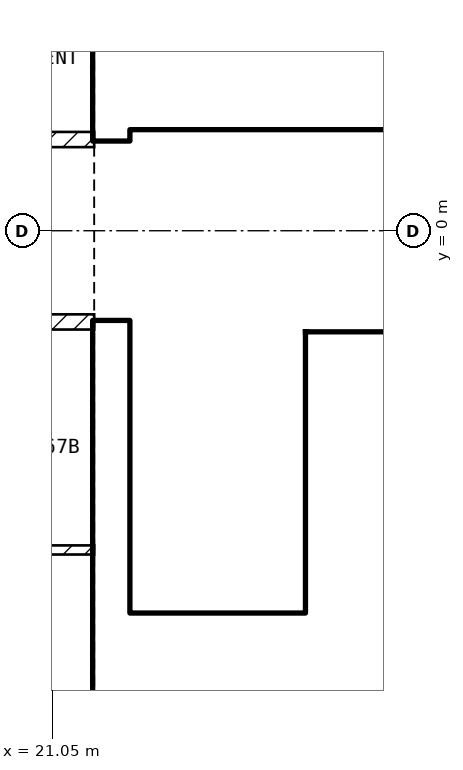
"""IFC4 building model, lengths in metres.
Left out: names, types, materials, properties, quantities, classifications, styles, units other than length and angle.
Written with IfcOpenShell. Run it as: python <this file> out.ifc"""

import sys

from ifc_helpers import new_model, si_unit, direction, frame, frame_2d, origin, place, context, subcontext, project, spatial, rectangle, extrude, element, fill, save


model = new_model("IFC4")
c1 = context("Model", 3, precision=1e-05, world=origin(), true_north=direction((0.0, 1.0)))
c2 = subcontext(c1, "Body", "Model", "MODEL_VIEW")
j1 = project(units=[si_unit("LENGTHUNIT", "METRE"), si_unit("PLANEANGLEUNIT", "RADIAN")], contexts=[c1])
p1 = place(None, origin())
s1 = spatial("IfcSite", under=j1, at=p1, CompositionType="ELEMENT")
p2 = place(p1, origin())
s2 = spatial("IfcBuilding", under=s1, at=p2, CompositionType="ELEMENT")
p3 = place(p2, frame((0.0, 0.0, 264.0)))
s3 = spatial("IfcBuildingStorey", under=s2, at=p3, CompositionType="ELEMENT", Elevation=264.0)
for number, where, z_axis, x_axis in (
    (1, (21.825, -8.1, 0.0), (0.0, 0.0, 1.0), (0.0, 1.0, 0.0)),
    (2, (21.825, 1.2, 0.0), (0.0, 0.0, 1.0), (0.0, 1.0, 0.0)),
):
    element("IfcWall", number, at=place(p3, frame(where, z_axis=z_axis, x_axis=x_axis)), inside=s3, PredefinedType="SHEAR", context=c2, shape_type="SweptSolid", body=[
        extrude(rectangle(XDim=6.9, YDim=0.45, at=frame_2d((3.45, 0.0))), origin(), (0.0, 0.0, 1.0), 3.25),
    ])
p4 = place(p3, frame((22.05, 1.45, 0.0), z_axis=(0.0, 0.0, 1.0), x_axis=(1.0, 0.0, 0.0)))
e3 = element("IfcWall", 3, at=p4, inside=s3, PredefinedType="SOLIDWALL", context=c2, shape_type="SweptSolid", body=[
    extrude(rectangle(XDim=11.3, YDim=0.2, at=frame_2d((5.65, 0.0))), origin(), (0.0, 0.0, 1.0), 3.25),
])
p5 = place(p4, frame((0.75, 0.0, 0.0)))
e4 = element("IfcOpeningElement", 4, at=p5, cuts=e3, PredefinedType="OPENING", context=c2, shape_type="SweptSolid", body=[
    extrude(rectangle(XDim=1.0, YDim=2.1, at=frame_2d((0.5, 1.05))), frame((0.0, 0.11, 0.0), z_axis=(0.0, -1.0, 0.0), x_axis=(1.0, 0.0, 0.0)), (0.0, 0.0, 1.0), 0.22),
])
p6 = place(p4, frame((3.25, 0.0, 0.0)))
e5 = element("IfcOpeningElement", 5, at=p6, cuts=e3, PredefinedType="OPENING", context=c2, shape_type="SweptSolid", body=[
    extrude(rectangle(XDim=1.0, YDim=2.1, at=frame_2d((0.5, 1.05))), frame((0.0, 0.11, 0.0), z_axis=(0.0, -1.0, 0.0), x_axis=(1.0, 0.0, 0.0)), (0.0, 0.0, 1.0), 0.22),
])
p7 = place(p4, frame((9.225, 0.0, 0.0)))
e6 = element("IfcOpeningElement", 6, at=p7, cuts=e3, PredefinedType="OPENING", context=c2, shape_type="SweptSolid", body=[
    extrude(rectangle(XDim=0.9, YDim=2.1, at=frame_2d((0.45, 1.05))), frame((0.0, 0.11, 0.0), z_axis=(0.0, -1.0, 0.0), x_axis=(1.0, 0.0, 0.0)), (0.0, 0.0, 1.0), 0.22),
])
p8 = place(p3, frame((24.5, -5.05, 0.0), z_axis=(0.0, 0.0, 1.0), x_axis=(0.0, 1.0, 0.0)))
e7 = element("IfcWall", 7, at=p8, inside=s3, PredefinedType="SOLIDWALL", context=c2, shape_type="SweptSolid", body=[
    extrude(rectangle(XDim=3.7, YDim=0.2, at=frame_2d((1.85, 0.0))), origin(), (0.0, 0.0, 1.0), 3.25),
])
p9 = place(p8, frame((0.1, 0.0, 0.0)))
e8 = element("IfcOpeningElement", 8, at=p9, cuts=e7, PredefinedType="OPENING", context=c2, shape_type="SweptSolid", body=[
    extrude(rectangle(XDim=0.8, YDim=2.1, at=frame_2d((0.4, 1.05))), frame((0.0, 0.11, 0.0), z_axis=(0.0, -1.0, 0.0), x_axis=(1.0, 0.0, 0.0)), (0.0, 0.0, 1.0), 0.22),
])
p10 = place(p3, frame((22.05, -5.15, 0.0), z_axis=(0.0, 0.0, 1.0), x_axis=(1.0, 0.0, 0.0)))
e9 = element("IfcWall", 9, at=p10, inside=s3, PredefinedType="SOLIDWALL", context=c2, shape_type="SweptSolid", body=[
    extrude(rectangle(XDim=6.3, YDim=0.2, at=frame_2d((3.15, 0.0))), origin(), (0.0, 0.0, 1.0), 3.25),
])
p11 = place(p10, frame((0.2, 0.0, 0.0)))
e10 = element("IfcOpeningElement", 10, at=p11, cuts=e9, PredefinedType="OPENING", context=c2, shape_type="SweptSolid", body=[
    extrude(rectangle(XDim=1.0, YDim=2.1, at=frame_2d((0.5, 1.05))), frame((0.0, 0.11, 0.0), z_axis=(0.0, -1.0, 0.0), x_axis=(1.0, 0.0, 0.0)), (0.0, 0.0, 1.0), 0.22),
])
p12 = place(p3, frame((24.6, -1.45, 0.0), z_axis=(0.0, 0.0, 1.0), x_axis=(1.0, 0.0, 0.0)))
e11 = element("IfcWall", 11, at=p12, inside=s3, PredefinedType="SOLIDWALL", context=c2, shape_type="SweptSolid", body=[
    extrude(rectangle(XDim=8.75, YDim=0.2, at=frame_2d((4.375, 0.0))), origin(), (0.0, 0.0, 1.0), 3.25),
])
p13 = place(p12, frame((0.4, 0.0, 0.0)))
e12 = element("IfcOpeningElement", 12, at=p13, cuts=e11, PredefinedType="OPENING", context=c2, shape_type="SweptSolid", body=[
    extrude(rectangle(XDim=1.0, YDim=2.1, at=frame_2d((0.5, 1.05))), frame((0.0, 0.11, 0.0), z_axis=(0.0, -1.0, 0.0), x_axis=(1.0, 0.0, 0.0)), (0.0, 0.0, 1.0), 0.22),
])
p14 = place(p12, frame((2.4, 0.0, 0.0)))
e13 = element("IfcOpeningElement", 13, at=p14, cuts=e11, PredefinedType="OPENING", context=c2, shape_type="SweptSolid", body=[
    extrude(rectangle(XDim=1.0, YDim=2.1, at=frame_2d((0.5, 1.05))), frame((0.0, 0.11, 0.0), z_axis=(0.0, -1.0, 0.0), x_axis=(1.0, 0.0, 0.0)), (0.0, 0.0, 1.0), 0.22),
])
p15 = place(p12, frame((4.4, 0.0, 0.0)))
e14 = element("IfcOpeningElement", 14, at=p15, cuts=e11, PredefinedType="OPENING", context=c2, shape_type="SweptSolid", body=[
    extrude(rectangle(XDim=1.0, YDim=2.1, at=frame_2d((0.5, 1.05))), frame((0.0, 0.11, 0.0), z_axis=(0.0, -1.0, 0.0), x_axis=(1.0, 0.0, 0.0)), (0.0, 0.0, 1.0), 0.22),
])
p16 = place(p12, frame((6.925, 0.0, 0.0)))
e15 = element("IfcOpeningElement", 15, at=p16, cuts=e11, PredefinedType="OPENING", context=c2, shape_type="SweptSolid", body=[
    extrude(rectangle(XDim=0.9, YDim=2.1, at=frame_2d((0.45, 1.05))), frame((0.0, 0.11, 0.0), z_axis=(0.0, -1.0, 0.0), x_axis=(1.0, 0.0, 0.0)), (0.0, 0.0, 1.0), 0.22),
])
p17 = place(p3, frame((24.6, -3.95, 0.0), z_axis=(0.0, 0.0, 1.0), x_axis=(1.0, 0.0, 0.0)))
e16 = element("IfcWall", 16, at=p17, inside=s3, PredefinedType="SOLIDWALL", context=c2, shape_type="SweptSolid", body=[
    extrude(rectangle(XDim=8.75, YDim=0.2, at=frame_2d((4.375, 0.0))), origin(), (0.0, 0.0, 1.0), 3.25),
])
p18 = place(p3, frame((4.4, 1.2, 0.0), z_axis=(0.0, 0.0, 1.0), x_axis=(1.0, 0.0, 0.0)))
e17 = element("IfcWall", 17, at=p18, inside=s3, PredefinedType="PARTITIONING", context=c2, shape_type="SweptSolid", body=[
    extrude(rectangle(XDim=17.2, YDim=0.2, at=frame_2d((8.6, 0.0))), origin(), (0.0, 0.0, 1.0), 3.25),
])
p19 = place(p18, frame((13.175, 0.0, 0.0)))
e18 = element("IfcOpeningElement", 18, at=p19, cuts=e17, PredefinedType="OPENING", context=c2, shape_type="SweptSolid", body=[
    extrude(rectangle(XDim=1.0, YDim=2.1, at=frame_2d((0.5, 1.05))), frame((0.0, 0.11, 0.0), z_axis=(0.0, -1.0, 0.0), x_axis=(1.0, 0.0, 0.0)), (0.0, 0.0, 1.0), 0.22),
])
p20 = place(p3, frame((21.6, -1.2, 0.0), z_axis=(0.0, 0.0, 1.0), x_axis=(-1.0, 0.0, 0.0)))
e19 = element("IfcWall", 19, at=p20, inside=s3, PredefinedType="PARTITIONING", context=c2, shape_type="SweptSolid", body=[
    extrude(rectangle(XDim=17.2, YDim=0.2, at=frame_2d((8.6, 0.0))), origin(), (0.0, 0.0, 1.0), 3.25),
])
p21 = place(p20, frame((10.45, 0.0, 0.0)))
e20 = element("IfcOpeningElement", 20, at=p21, cuts=e19, PredefinedType="OPENING", context=c2, shape_type="SweptSolid", body=[
    extrude(rectangle(XDim=1.0, YDim=2.1, at=frame_2d((0.5, 1.05))), frame((0.0, 0.11, 0.0), z_axis=(0.0, -1.0, 0.0), x_axis=(1.0, 0.0, 0.0)), (0.0, 0.0, 1.0), 0.22),
])
p22 = place(p3, frame((21.6, -4.2, 0.0), z_axis=(0.0, 0.0, 1.0), x_axis=(-1.0, 0.0, 0.0)))
e21 = element("IfcWall", 21, at=p22, inside=s3, PredefinedType="PARTITIONING", context=c2, shape_type="SweptSolid", body=[
    extrude(rectangle(XDim=2.4, YDim=0.12, at=frame_2d((1.2, 0.0))), origin(), (0.0, 0.0, 1.0), 3.25),
])
p23 = place(p22, frame((0.75, 0.0, 0.0)))
e22 = element("IfcOpeningElement", 22, at=p23, cuts=e21, PredefinedType="OPENING", context=c2, shape_type="SweptSolid", body=[
    extrude(rectangle(XDim=0.9, YDim=2.1, at=frame_2d((0.45, 1.05))), frame((0.0, 0.07, 0.0), z_axis=(0.0, -1.0, 0.0), x_axis=(1.0, 0.0, 0.0)), (0.0, 0.0, 1.0), 0.14),
])
p24 = place(p13, origin())
e23 = element("IfcDoor", 23, at=p24, inside=s3, OperationType="DOUBLE_DOOR_SLIDING", PredefinedType="DOOR", context=c2, shape_type="SweptSolid", body=[
    extrude(rectangle(XDim=1.0, YDim=2.1, at=frame_2d((0.5, 1.05))), frame((0.0, 0.025, 0.0), z_axis=(0.0, -1.0, 0.0), x_axis=(1.0, 0.0, 0.0)), (0.0, 0.0, 1.0), 0.05),
])
fill(e12, e23)
p25 = place(p11, origin())
e24 = element("IfcDoor", 24, at=p25, inside=s3, OperationType="SINGLE_SWING_LEFT", PredefinedType="DOOR", context=c2, shape_type="SweptSolid", body=[
    extrude(rectangle(XDim=1.0, YDim=2.1, at=frame_2d((0.5, 1.05))), frame((0.0, 0.025, 0.0), z_axis=(0.0, -1.0, 0.0), x_axis=(1.0, 0.0, 0.0)), (0.0, 0.0, 1.0), 0.05),
])
fill(e10, e24)
p26 = place(p5, origin())
e25 = element("IfcDoor", 25, at=p26, inside=s3, OperationType="SINGLE_SWING_LEFT", PredefinedType="DOOR", context=c2, shape_type="SweptSolid", body=[
    extrude(rectangle(XDim=1.0, YDim=2.1, at=frame_2d((0.5, 1.05))), frame((0.0, 0.025, 0.0), z_axis=(0.0, -1.0, 0.0), x_axis=(1.0, 0.0, 0.0)), (0.0, 0.0, 1.0), 0.05),
])
fill(e4, e25)
p27 = place(p9, origin())
e26 = element("IfcDoor", 26, at=p27, inside=s3, OperationType="SINGLE_SWING_LEFT", PredefinedType="DOOR", context=c2, shape_type="SweptSolid", body=[
    extrude(rectangle(XDim=0.8, YDim=2.1, at=frame_2d((0.4, 1.05))), frame((0.0, 0.025, 0.0), z_axis=(0.0, -1.0, 0.0), x_axis=(1.0, 0.0, 0.0)), (0.0, 0.0, 1.0), 0.05),
])
fill(e8, e26)
p28 = place(p6, origin())
e27 = element("IfcDoor", 27, at=p28, inside=s3, OperationType="SINGLE_SWING_LEFT", PredefinedType="DOOR", context=c2, shape_type="SweptSolid", body=[
    extrude(rectangle(XDim=1.0, YDim=2.1, at=frame_2d((0.5, 1.05))), frame((0.0, 0.025, 0.0), z_axis=(0.0, -1.0, 0.0), x_axis=(1.0, 0.0, 0.0)), (0.0, 0.0, 1.0), 0.05),
])
fill(e5, e27)
save(model, sys.argv[1])
